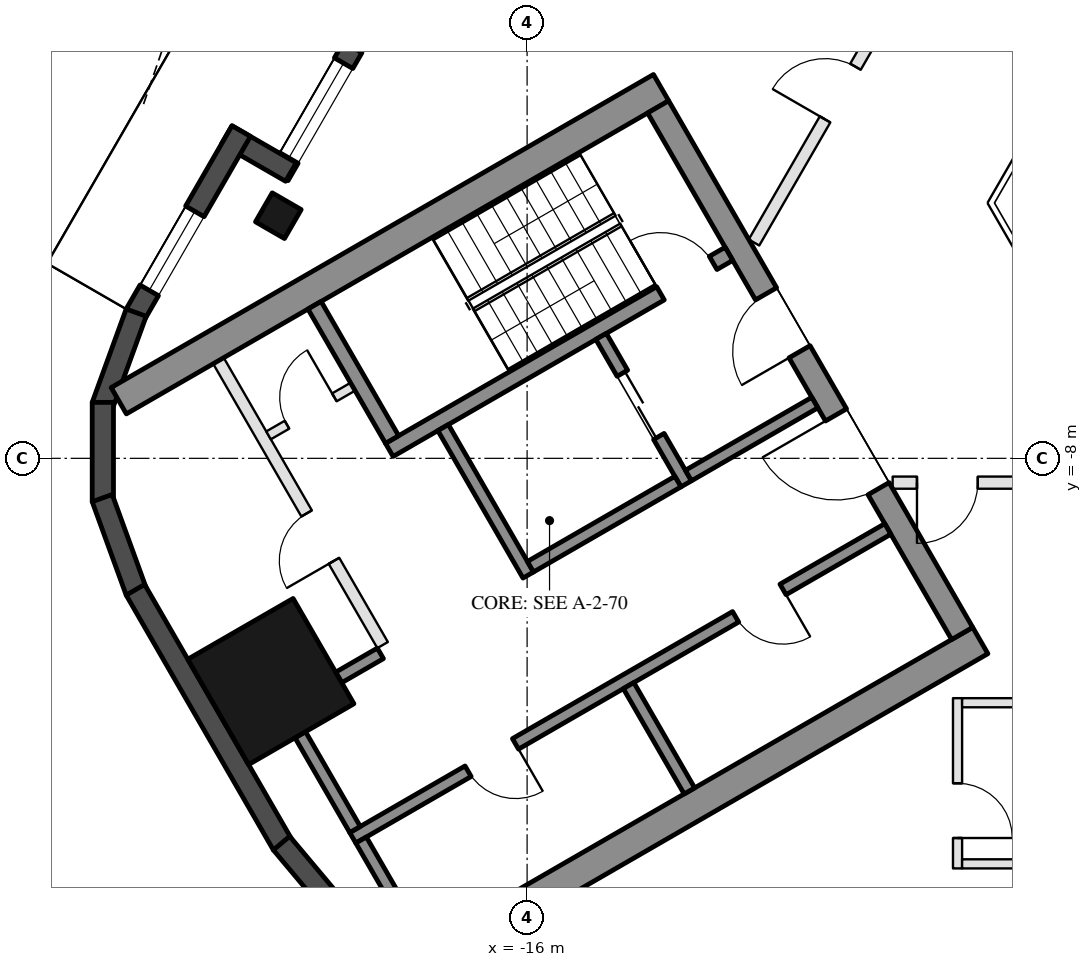
"""IFC4 building model, lengths in metres.
Left out: names, types, materials, properties, quantities, classifications, styles, units other than length and angle.
Written with IfcOpenShell. Run it as: python <this file> out.ifc"""

import sys

from ifc_helpers import new_model, si_unit, direction, frame, frame_2d, origin, origin_2d, place, context, subcontext, project, spatial, rectangle, hollow_rectangle, extrude, boolean, halfspace, element, fill, save


model = new_model("IFC4")
c1 = context("Model", 3, precision=1e-05, world=origin(), true_north=direction((0.0, 1.0)))
c2 = subcontext(c1, "Body", "Model", "MODEL_VIEW")
j1 = project(units=[si_unit("LENGTHUNIT", "METRE"), si_unit("PLANEANGLEUNIT", "RADIAN")], contexts=[c1])
p1 = place(None, origin())
s1 = spatial("IfcSite", under=j1, at=p1, CompositionType="ELEMENT")
p2 = place(p1, origin())
s2 = spatial("IfcBuilding", under=s1, at=p2, CompositionType="ELEMENT")
p3 = place(p2, frame((0.0, 0.0, 302.2)))
s3 = spatial("IfcBuildingStorey", under=s2, at=p3, CompositionType="ELEMENT", Elevation=302.2)
p4 = place(p3, frame((-20.091, -4.01, 0.0), z_axis=(0.0, 0.0, 1.0), x_axis=(0.5, 0.866025403784, 0.0)))
e1 = element("IfcColumn", 1, at=p4, inside=s3, PredefinedType="COLUMN", context=c2, shape_type="SweptSolid", body=[
    boolean("DIFFERENCE", extrude(hollow_rectangle(XDim=0.55, YDim=0.55, WallThickness=0.025, at=origin_2d()), origin(), (0.0, 0.0, 1.0), 3.7), halfspace(frame((0.0, 0.0, 0.04), z_axis=(0.0, 0.0, 1.0), x_axis=(1.0, 0.0, 0.0)), True)),
])
p5 = place(p3, frame((-20.214, -11.671, 0.0), z_axis=(0.0, 0.0, 1.0), x_axis=(-0.5, 0.866025403784, 0.0)))
e2 = element("IfcColumn", 2, at=p5, inside=s3, PredefinedType="COLUMN", context=c2, shape_type="SweptSolid", body=[
    boolean("DIFFERENCE", extrude(hollow_rectangle(XDim=2.0, YDim=2.0, WallThickness=0.05, at=origin_2d()), origin(), (0.0, 0.0, 1.0), 3.7), halfspace(frame((0.0, 0.0, 0.113), z_axis=(0.0, 0.0, 1.0), x_axis=(1.0, 0.0, 0.0)), True)),
])
p6 = place(p3, frame((-17.283, 1.504, 0.0), z_axis=(0.0, 0.0, 1.0), x_axis=(-0.500008054862, -0.866020753258, 0.0)))
e3 = element("IfcWall", 3, at=p6, inside=s3, PredefinedType="SOLIDWALL", context=c2, shape_type="SweptSolid", body=[
    extrude(rectangle(XDim=5.599, YDim=0.35, at=frame_2d((2.8, 0.0))), origin(), (0.0, 0.0, 1.0), 3.55),
])
p7 = place(p6, frame((0.77, 0.0, 0.0)))
e4 = element("IfcOpeningElement", 4, at=p7, cuts=e3, PredefinedType="OPENING", context=c2, shape_type="SweptSolid", body=[
    extrude(rectangle(XDim=2.4, YDim=2.4, at=frame_2d((1.2, 1.2))), frame((0.0, 0.185, 0.0), z_axis=(0.0, -1.0, 0.0), x_axis=(1.0, 0.0, 0.0)), (0.0, 0.0, 1.0), 0.37),
])
p8 = place(p6, frame((3.47, 0.0, 0.3)))
e5 = element("IfcOpeningElement", 5, at=p8, cuts=e3, PredefinedType="OPENING", context=c2, shape_type="SweptSolid", body=[
    extrude(rectangle(XDim=1.8, YDim=2.65, at=frame_2d((0.9, 1.325))), frame((0.0, 0.185, 0.0), z_axis=(0.0, -1.0, 0.0), x_axis=(1.0, 0.0, 0.0)), (0.0, 0.0, 1.0), 0.37),
])
p9 = place(p3, frame((-19.884, -3.292, 0.0), z_axis=(0.0, 0.0, 1.0), x_axis=(-0.866005645448, 0.500034220881, 0.0)))
e6 = element("IfcWall", 6, at=p9, inside=s3, PredefinedType="SOLIDWALL", context=c2, shape_type="SweptSolid", body=[
    extrude(rectangle(XDim=1.22, YDim=0.35, at=frame_2d((0.61, 0.0))), origin(), (0.0, 0.0, 1.0), 3.55),
])
p10 = place(p3, frame((-20.702, -2.618, 0.0), z_axis=(0.0, 0.0, 1.0), x_axis=(-0.499979528911, -0.866037222451, 0.0)))
e7 = element("IfcWall", 7, at=p10, inside=s3, PredefinedType="SOLIDWALL", context=c2, shape_type="SweptSolid", body=[
    extrude(rectangle(XDim=3.48, YDim=0.35, at=frame_2d((1.74, 0.0))), origin(), (0.0, 0.0, 1.0), 3.55),
])
p11 = place(p10, frame((1.525, 0.0, 0.3)))
e8 = element("IfcOpeningElement", 8, at=p11, cuts=e7, PredefinedType="OPENING", context=c2, shape_type="SweptSolid", body=[
    extrude(rectangle(XDim=1.5, YDim=2.65, at=frame_2d((0.75, 1.325))), frame((0.0, 0.185, 0.0), z_axis=(0.0, -1.0, 0.0), x_axis=(1.0, 0.0, 0.0)), (0.0, 0.0, 1.0), 0.37),
])
for number, where, z_axis, x_axis in (
    (9, (-22.429, -5.604, 0.0), (0.0, 0.0, 1.0), (-0.342, -0.94, 0.0)),
    (10, (-22.977, -7.08, 0.0), (0.0, 0.0, 1.0), (0.0, -1.0, 0.0)),
    (11, (-22.988, -8.654, 0.0), (0.0, 0.0, 1.0), (0.342, -0.94, 0.0)),
):
    element("IfcWall", number, at=place(p3, frame(where, z_axis=z_axis, x_axis=x_axis)), inside=s3, PredefinedType="SOLIDWALL", context=c2, shape_type="SweptSolid", body=[
        extrude(rectangle(XDim=1.634, YDim=0.35, at=frame_2d((0.817, 0.0))), origin(), (0.0, 0.0, 1.0), 3.55),
    ])
p12 = place(p3, frame((-22.442, -10.162, 0.0), z_axis=(0.0, 0.0, 1.0), x_axis=(0.500012048649, -0.866018447382, 0.0)))
e12 = element("IfcWall", 12, at=p12, inside=s3, PredefinedType="SOLIDWALL", context=c2, shape_type="SweptSolid", body=[
    extrude(rectangle(XDim=4.841, YDim=0.35, at=frame_2d((2.42, 0.0))), origin(), (0.0, 0.0, 1.0), 3.55),
])
p13 = place(p3, frame((-20.039, -14.329, 0.0), z_axis=(0.0, 0.0, 1.0), x_axis=(0.642708448155, -0.766110860562, 0.0)))
e13 = element("IfcWall", 13, at=p13, inside=s3, PredefinedType="SOLIDWALL", context=c2, shape_type="SweptSolid", body=[
    extrude(rectangle(XDim=1.634, YDim=0.35, at=frame_2d((0.817, 0.0))), origin(), (0.0, 0.0, 1.0), 3.55),
])
for number, where, z_axis, x_axis in (
    (14, (-13.797, -1.903, 0.0), (0.0, 0.0, 1.0), (-0.866, -0.5, 0.0)),
    (15, (-8.547, -10.997, 0.0), (0.0, 0.0, 1.0), (-0.866, -0.5, 0.0)),
):
    element("IfcWall", number, at=place(p3, frame(where, z_axis=z_axis, x_axis=x_axis)), inside=s3, PredefinedType="SHEAR", context=c2, shape_type="SweptSolid", body=[
        extrude(rectangle(XDim=10.298, YDim=0.5, at=frame_2d((5.149, 0.0))), origin(), (0.0, 0.0, 1.0), 3.5),
    ])
p14 = place(p3, frame((-13.845, -2.22, 0.0), z_axis=(0.0, 0.0, 1.0), x_axis=(0.500004234368, -0.866022959057, 0.0)))
e16 = element("IfcWall", 16, at=p14, inside=s3, PredefinedType="SHEAR", context=c2, shape_type="SweptSolid", body=[
    extrude(rectangle(XDim=10.0, YDim=0.4, at=frame_2d((5.0, 0.0))), origin(), (0.0, 0.0, 1.0), 3.5),
])
p15 = place(p14, frame((3.55, 0.0, 0.0)))
e17 = element("IfcOpeningElement", 17, at=p15, cuts=e16, PredefinedType="OPENING", context=c2, shape_type="SweptSolid", body=[
    extrude(rectangle(XDim=1.1, YDim=2.1, at=frame_2d((0.55, 1.05))), frame((0.0, 0.21, 0.0), z_axis=(0.0, -1.0, 0.0), x_axis=(1.0, 0.0, 0.0)), (0.0, 0.0, 1.0), 0.42),
])
p16 = place(p14, frame((5.85, 0.0, 0.0)))
e18 = element("IfcOpeningElement", 18, at=p16, cuts=e16, PredefinedType="OPENING", context=c2, shape_type="SweptSolid", body=[
    extrude(rectangle(XDim=1.4, YDim=2.1, at=frame_2d((0.7, 1.05))), frame((0.0, 0.21, 0.0), z_axis=(0.0, -1.0, 0.0), x_axis=(1.0, 0.0, 0.0)), (0.0, 0.0, 1.0), 0.42),
])
p17 = place(p3, frame((-12.681, -4.636, 0.0), z_axis=(0.0, 0.0, 1.0), x_axis=(-0.866021702275, -0.500006411147, 0.0)))
e19 = element("IfcWall", 19, at=p17, inside=s3, PredefinedType="SHEAR", context=c2, shape_type="SweptSolid", body=[
    extrude(rectangle(XDim=6.45, YDim=0.25, at=frame_2d((3.225, 0.0))), origin(), (0.0, 0.0, 1.0), 3.5),
])
p18 = place(p17, frame((0.3, 0.0, 0.0)))
e20 = element("IfcOpeningElement", 20, at=p18, cuts=e19, PredefinedType="OPENING", context=c2, shape_type="SweptSolid", body=[
    extrude(rectangle(XDim=1.0, YDim=2.1, at=frame_2d((0.5, 1.05))), frame((0.0, 0.135, 0.0), z_axis=(0.0, -1.0, 0.0), x_axis=(1.0, 0.0, 0.0)), (0.0, 0.0, 1.0), 0.27),
])
p19 = place(p3, frame((-19.496, -5.482, 0.0), z_axis=(0.0, 0.0, 1.0), x_axis=(0.499990435942, -0.866030925526, 0.0)))
e21 = element("IfcWall", 21, at=p19, inside=s3, PredefinedType="SHEAR", context=c2, shape_type="SweptSolid", body=[
    extrude(rectangle(XDim=2.55, YDim=0.25, at=frame_2d((1.275, 0.0))), origin(), (0.0, 0.0, 1.0), 3.5),
])
p20 = place(p3, frame((-17.381, -7.495, 0.0), z_axis=(0.0, 0.0, 1.0), x_axis=(0.500011755427, -0.866018616679, 0.0)))
e22 = element("IfcWall", 22, at=p20, inside=s3, PredefinedType="SHEAR", context=c2, shape_type="SweptSolid", body=[
    extrude(rectangle(XDim=2.8, YDim=0.2, at=frame_2d((1.4, 0.0))), origin(), (0.0, 0.0, 1.0), 3.5),
])
p21 = place(p3, frame((-14.783, -5.995, 0.0), z_axis=(0.0, 0.0, 1.0), x_axis=(0.49994636267, -0.866056369097, 0.0)))
e23 = element("IfcWall", 23, at=p21, inside=s3, PredefinedType="SHEAR", context=c2, shape_type="SweptSolid", body=[
    extrude(rectangle(XDim=2.8, YDim=0.2, at=frame_2d((1.4, 0.0))), origin(), (0.0, 0.0, 1.0), 3.5),
])
p22 = place(p21, frame((0.7, 0.0, 0.0)))
e24 = element("IfcOpeningElement", 24, at=p22, cuts=e23, PredefinedType="OPENING", context=c2, shape_type="SweptSolid", body=[
    extrude(rectangle(XDim=1.2, YDim=2.1, at=frame_2d((0.6, 1.05))), frame((0.0, 0.11, 0.0), z_axis=(0.0, -1.0, 0.0), x_axis=(1.0, 0.0, 0.0)), (0.0, 0.0, 1.0), 0.22),
])
p23 = place(p3, frame((-13.52, -8.383, 0.0), z_axis=(0.0, 0.0, 1.0), x_axis=(-0.866034573852, -0.49998411664, 0.0)))
e25 = element("IfcWall", 25, at=p23, inside=s3, PredefinedType="SHEAR", context=c2, shape_type="SweptSolid", body=[
    extrude(rectangle(XDim=2.8, YDim=0.2, at=frame_2d((1.4, 0.0))), origin(), (0.0, 0.0, 1.0), 3.5),
])
p24 = place(p3, frame((-11.268, -7.083, 0.0), z_axis=(0.0, 0.0, 1.0), x_axis=(-0.866050077142, -0.499957262057, 0.0)))
e26 = element("IfcWall", 26, at=p24, inside=s3, PredefinedType="SHEAR", context=c2, shape_type="SweptSolid", body=[
    extrude(rectangle(XDim=2.4, YDim=0.2, at=frame_2d((1.2, 0.0))), origin(), (0.0, 0.0, 1.0), 3.5),
])
p25 = place(p3, frame((-10.068, -9.162, 0.0), z_axis=(0.0, 0.0, 1.0), x_axis=(-0.866032725843, -0.499987317609, 0.0)))
e27 = element("IfcWall", 27, at=p25, inside=s3, PredefinedType="SHEAR", context=c2, shape_type="SweptSolid", body=[
    extrude(rectangle(XDim=10.16, YDim=0.2, at=frame_2d((5.08, 0.0))), origin(), (0.0, 0.0, 1.0), 3.5),
])
p26 = place(p25, frame((1.99, 0.0, 0.0)))
e28 = element("IfcOpeningElement", 28, at=p26, cuts=e27, PredefinedType="OPENING", context=c2, shape_type="SweptSolid", body=[
    extrude(rectangle(XDim=0.9, YDim=2.1, at=frame_2d((0.45, 1.05))), frame((0.0, 0.11, 0.0), z_axis=(0.0, -1.0, 0.0), x_axis=(1.0, 0.0, 0.0)), (0.0, 0.0, 1.0), 0.22),
])
p27 = place(p25, frame((7.07, 0.0, 0.0)))
e29 = element("IfcOpeningElement", 29, at=p27, cuts=e27, PredefinedType="OPENING", context=c2, shape_type="SweptSolid", body=[
    extrude(rectangle(XDim=0.9, YDim=2.1, at=frame_2d((0.45, 1.05))), frame((0.0, 0.11, 0.0), z_axis=(0.0, -1.0, 0.0), x_axis=(1.0, 0.0, 0.0)), (0.0, 0.0, 1.0), 0.22),
])
p28 = place(p3, frame((-19.73, -12.546, 0.0), z_axis=(0.0, 0.0, 1.0), x_axis=(0.500004188491, -0.866022985545, 0.0)))
e30 = element("IfcWall", 30, at=p28, inside=s3, PredefinedType="SHEAR", context=c2, shape_type="SweptSolid", body=[
    extrude(rectangle(XDim=1.8, YDim=0.2, at=frame_2d((0.9, 0.0))), origin(), (0.0, 0.0, 1.0), 3.5),
])
p29 = place(p3, frame((-18.413, -11.208, 0.0), z_axis=(0.0, 0.0, 1.0), x_axis=(-0.86597493103, -0.500087411186, 0.0)))
e31 = element("IfcWall", 31, at=p29, inside=s3, PredefinedType="SHEAR", context=c2, shape_type="SweptSolid", body=[
    extrude(rectangle(XDim=0.791, YDim=0.2, at=frame_2d((0.396, 0.0))), origin(), (0.0, 0.0, 1.0), 3.5),
])
for number, where, z_axis, x_axis in (
    (32, (-14.331, -11.738, 0.0), (0.0, 0.0, 1.0), (0.5, -0.866, 0.0)),
    (33, (-18.73, -14.278, 0.0), (0.0, 0.0, 1.0), (0.5, -0.866, 0.0)),
):
    element("IfcWall", number, at=place(p3, frame(where, z_axis=z_axis, x_axis=x_axis)), inside=s3, PredefinedType="SHEAR", context=c2, shape_type="SweptSolid", body=[
        extrude(rectangle(XDim=2.0, YDim=0.2, at=frame_2d((1.0, 0.0))), origin(), (0.0, 0.0, 1.0), 3.5),
    ])
p30 = place(p3, frame((-21.076, -6.395, 0.0), z_axis=(0.0, 0.0, 1.0), x_axis=(0.50001468107, -0.866016927499, 0.0)))
e34 = element("IfcWall", 34, at=p30, inside=s3, PredefinedType="PARTITIONING", context=c2, shape_type="SweptSolid", body=[
    extrude(rectangle(XDim=5.4, YDim=0.2, at=frame_2d((2.7, 0.0))), origin(), (0.0, 0.0, 1.0), 3.5),
])
p31 = place(p30, frame((2.9, 0.0, 0.0)))
e35 = element("IfcOpeningElement", 35, at=p31, cuts=e34, PredefinedType="OPENING", context=c2, shape_type="SweptSolid", body=[
    extrude(rectangle(XDim=0.9, YDim=2.1, at=frame_2d((0.45, 1.05))), frame((0.0, 0.11, 0.0), z_axis=(0.0, -1.0, 0.0), x_axis=(1.0, 0.0, 0.0)), (0.0, 0.0, 1.0), 0.22),
])
p32 = place(p3, frame((-18.866, -6.822, 0.0), z_axis=(0.0, 0.0, 1.0), x_axis=(-0.866028054938, -0.499995408039, 0.0)))
e36 = element("IfcWall", 36, at=p32, inside=s3, PredefinedType="PARTITIONING", context=c2, shape_type="SweptSolid", body=[
    extrude(rectangle(XDim=1.6, YDim=0.15, at=frame_2d((0.8, 0.0))), origin(), (0.0, 0.0, 1.0), 3.5),
])
p33 = place(p32, frame((0.35, 0.0, 0.0)))
e37 = element("IfcOpeningElement", 37, at=p33, cuts=e36, PredefinedType="OPENING", context=c2, shape_type="SweptSolid", body=[
    extrude(rectangle(XDim=0.9, YDim=2.1, at=frame_2d((0.45, 1.05))), frame((0.0, 0.085, 0.0), z_axis=(0.0, -1.0, 0.0), x_axis=(1.0, 0.0, 0.0)), (0.0, 0.0, 1.0), 0.17),
])
p34 = place(p3, frame((-7.93, -16.445, 0.0), z_axis=(0.0, 0.0, 1.0), x_axis=(0.224458408835, 0.974483669798, 0.0)))
e38 = element("IfcWall", 38, at=p34, inside=s3, PredefinedType="PARTITIONING", context=c2, shape_type="SweptSolid", body=[
    extrude(rectangle(XDim=8.358, YDim=0.2, at=frame_2d((4.179, 0.0))), origin(), (0.0, 0.0, 1.0), 3.1),
])
p35 = place(p3, frame((-6.18, -8.4, 0.0), z_axis=(0.0, 0.0, 1.0), x_axis=(-1.0, 0.0, 0.0)))
e39 = element("IfcWall", 39, at=p35, inside=s3, PredefinedType="PARTITIONING", context=c2, shape_type="SweptSolid", body=[
    extrude(rectangle(XDim=3.809, YDim=0.2, at=frame_2d((1.904, 0.0))), origin(), (0.0, 0.0, 1.0), 3.1),
])
p36 = place(p35, frame((2.409, 0.0, 0.0)))
e40 = element("IfcOpeningElement", 40, at=p36, cuts=e39, PredefinedType="OPENING", context=c2, shape_type="SweptSolid", body=[
    extrude(rectangle(XDim=1.0, YDim=2.1, at=frame_2d((0.5, 1.05))), frame((0.0, 0.11, 0.0), z_axis=(0.0, -1.0, 0.0), x_axis=(1.0, 0.0, 0.0)), (0.0, 0.0, 1.0), 0.22),
])
p37 = place(p3, frame((-8.921, -11.945, 0.0), z_axis=(0.0, 0.0, 1.0), x_axis=(0.0, -1.0, 0.0)))
e41 = element("IfcWall", 41, at=p37, inside=s3, PredefinedType="PARTITIONING", context=c2, shape_type="SweptSolid", body=[
    extrude(rectangle(XDim=2.8, YDim=0.15, at=frame_2d((1.4, 0.0))), origin(), (0.0, 0.0, 1.0), 3.55),
])
p38 = place(p37, frame((1.4, 0.0, 0.0)))
e42 = element("IfcOpeningElement", 42, at=p38, cuts=e41, PredefinedType="OPENING", context=c2, shape_type="SweptSolid", body=[
    extrude(rectangle(XDim=0.9, YDim=2.1, at=frame_2d((0.45, 1.05))), frame((0.0, 0.085, 0.0), z_axis=(0.0, -1.0, 0.0), x_axis=(1.0, 0.0, 0.0)), (0.0, 0.0, 1.0), 0.17),
])
p39 = place(p3, frame((-8.846, -14.67, 0.0), z_axis=(0.0, 0.0, 1.0), x_axis=(1.0, 0.0, 0.0)))
e43 = element("IfcWall", 43, at=p39, inside=s3, PredefinedType="PARTITIONING", context=c2, shape_type="SweptSolid", body=[
    extrude(rectangle(XDim=1.222, YDim=0.15, at=frame_2d((0.611, 0.0))), origin(), (0.0, 0.0, 1.0), 3.55),
])
p40 = place(p3, frame((-8.846, -12.02, 0.0), z_axis=(0.0, 0.0, 1.0), x_axis=(1.0, 0.0, 0.0)))
e44 = element("IfcWall", 44, at=p40, inside=s3, PredefinedType="PARTITIONING", context=c2, shape_type="SweptSolid", body=[
    extrude(rectangle(XDim=1.833, YDim=0.15, at=frame_2d((0.917, 0.0))), origin(), (0.0, 0.0, 1.0), 3.55),
])
p41 = place(p3, frame((-12.269, -4.45, 0.0), z_axis=(0.0, 0.0, 1.0), x_axis=(0.50002670742, 0.866009983699, 0.0)))
e45 = element("IfcWall", 45, at=p41, inside=s3, PredefinedType="PARTITIONING", context=c2, shape_type="SweptSolid", body=[
    extrude(rectangle(XDim=5.788, YDim=0.2, at=frame_2d((2.894, 0.0))), origin(), (0.0, 0.0, 1.0), 3.1),
])
p42 = place(p41, frame((2.338, 0.0, 0.0)))
e46 = element("IfcOpeningElement", 46, at=p42, cuts=e45, PredefinedType="OPENING", context=c2, shape_type="SweptSolid", body=[
    extrude(rectangle(XDim=1.0, YDim=2.1, at=frame_2d((0.5, 1.05))), frame((0.0, 0.11, 0.0), z_axis=(0.0, -1.0, 0.0), x_axis=(1.0, 0.0, 0.0)), (0.0, 0.0, 1.0), 0.22),
])
p43 = place(p8, origin())
e47 = element("IfcWindow", 47, at=p43, inside=s3, PartitioningType="SINGLE_PANEL", PredefinedType="WINDOW", context=c2, shape_type="SweptSolid", body=[
    extrude(rectangle(XDim=1.8, YDim=2.65, at=frame_2d((0.9, 1.325))), frame((0.0, 0.03, 0.0), z_axis=(0.0, -1.0, 0.0), x_axis=(1.0, 0.0, 0.0)), (0.0, 0.0, 1.0), 0.06),
])
fill(e5, e47)
p44 = place(p11, origin())
e48 = element("IfcWindow", 48, at=p44, inside=s3, PartitioningType="SINGLE_PANEL", PredefinedType="WINDOW", context=c2, shape_type="SweptSolid", body=[
    extrude(rectangle(XDim=1.5, YDim=2.65, at=frame_2d((0.75, 1.325))), frame((0.0, 0.03, 0.0), z_axis=(0.0, -1.0, 0.0), x_axis=(1.0, 0.0, 0.0)), (0.0, 0.0, 1.0), 0.06),
])
fill(e8, e48)
p45 = place(p22, origin())
e49 = element("IfcDoor", 49, at=p45, inside=s3, OperationType="DOUBLE_DOOR_SLIDING", PredefinedType="DOOR", context=c2, shape_type="SweptSolid", body=[
    extrude(rectangle(XDim=1.2, YDim=2.1, at=frame_2d((0.6, 1.05))), frame((0.0, 0.025, 0.0), z_axis=(0.0, -1.0, 0.0), x_axis=(1.0, 0.0, 0.0)), (0.0, 0.0, 1.0), 0.05),
])
fill(e24, e49)
p46 = place(p33, frame((0.9, 0.0, 0.0), z_axis=(0.0, 0.0, 1.0), x_axis=(-1.0, 0.0, 0.0)))
e50 = element("IfcDoor", 50, at=p46, inside=s3, OperationType="SINGLE_SWING_RIGHT", PredefinedType="DOOR", context=c2, shape_type="SweptSolid", body=[
    extrude(rectangle(XDim=0.9, YDim=2.1, at=frame_2d((0.45, 1.05))), frame((0.0, 0.025, 0.0), z_axis=(0.0, -1.0, 0.0), x_axis=(1.0, 0.0, 0.0)), (0.0, 0.0, 1.0), 0.05),
])
fill(e37, e50)
p47 = place(p26, origin())
e51 = element("IfcDoor", 51, at=p47, inside=s3, OperationType="SINGLE_SWING_LEFT", PredefinedType="DOOR", context=c2, shape_type="SweptSolid", body=[
    extrude(rectangle(XDim=0.9, YDim=2.1, at=frame_2d((0.45, 1.05))), frame((0.0, 0.025, 0.0), z_axis=(0.0, -1.0, 0.0), x_axis=(1.0, 0.0, 0.0)), (0.0, 0.0, 1.0), 0.05),
])
fill(e28, e51)
p48 = place(p27, origin())
e52 = element("IfcDoor", 52, at=p48, inside=s3, OperationType="SINGLE_SWING_LEFT", PredefinedType="DOOR", context=c2, shape_type="SweptSolid", body=[
    extrude(rectangle(XDim=0.9, YDim=2.1, at=frame_2d((0.45, 1.05))), frame((0.0, 0.025, 0.0), z_axis=(0.0, -1.0, 0.0), x_axis=(1.0, 0.0, 0.0)), (0.0, 0.0, 1.0), 0.05),
])
fill(e29, e52)
p49 = place(p31, frame((0.9, 0.0, 0.0), z_axis=(0.0, 0.0, 1.0), x_axis=(-1.0, 0.0, 0.0)))
e53 = element("IfcDoor", 53, at=p49, inside=s3, OperationType="SINGLE_SWING_LEFT", PredefinedType="DOOR", context=c2, shape_type="SweptSolid", body=[
    extrude(rectangle(XDim=0.9, YDim=2.1, at=frame_2d((0.45, 1.05))), frame((0.0, 0.025, 0.0), z_axis=(0.0, -1.0, 0.0), x_axis=(1.0, 0.0, 0.0)), (0.0, 0.0, 1.0), 0.05),
])
fill(e35, e53)
p50 = place(p15, frame((1.1, 0.0, 0.0), z_axis=(0.0, 0.0, 1.0), x_axis=(-1.0, 0.0, 0.0)))
e54 = element("IfcDoor", 54, at=p50, inside=s3, OperationType="SINGLE_SWING_LEFT", PredefinedType="DOOR", context=c2, shape_type="SweptSolid", body=[
    extrude(rectangle(XDim=1.1, YDim=2.1, at=frame_2d((0.55, 1.05))), frame((0.0, 0.025, 0.0), z_axis=(0.0, -1.0, 0.0), x_axis=(1.0, 0.0, 0.0)), (0.0, 0.0, 1.0), 0.05),
])
fill(e17, e54)
p51 = place(p16, frame((1.4, 0.0, 0.0), z_axis=(0.0, 0.0, 1.0), x_axis=(-1.0, 0.0, 0.0)))
e55 = element("IfcDoor", 55, at=p51, inside=s3, OperationType="DOUBLE_DOOR_SINGLE_SWING", PredefinedType="DOOR", context=c2, shape_type="SweptSolid", body=[
    extrude(rectangle(XDim=1.4, YDim=2.1, at=frame_2d((0.7, 1.05))), frame((0.0, 0.025, 0.0), z_axis=(0.0, -1.0, 0.0), x_axis=(1.0, 0.0, 0.0)), (0.0, 0.0, 1.0), 0.05),
])
fill(e18, e55)
p52 = place(p18, frame((1.0, 0.0, 0.0), z_axis=(0.0, 0.0, 1.0), x_axis=(-1.0, 0.0, 0.0)))
e56 = element("IfcDoor", 56, at=p52, inside=s3, OperationType="SINGLE_SWING_LEFT", PredefinedType="DOOR", context=c2, shape_type="SweptSolid", body=[
    extrude(rectangle(XDim=1.0, YDim=2.1, at=frame_2d((0.5, 1.05))), frame((0.0, 0.025, 0.0), z_axis=(0.0, -1.0, 0.0), x_axis=(1.0, 0.0, 0.0)), (0.0, 0.0, 1.0), 0.05),
])
fill(e20, e56)
p53 = place(p38, origin())
e57 = element("IfcDoor", 57, at=p53, inside=s3, OperationType="SINGLE_SWING_RIGHT", PredefinedType="DOOR", context=c2, shape_type="SweptSolid", body=[
    extrude(rectangle(XDim=0.9, YDim=2.1, at=frame_2d((0.45, 1.05))), frame((0.0, 0.025, 0.0), z_axis=(0.0, -1.0, 0.0), x_axis=(1.0, 0.0, 0.0)), (0.0, 0.0, 1.0), 0.05),
])
fill(e42, e57)
p54 = place(p36, origin())
e58 = element("IfcDoor", 58, at=p54, inside=s3, OperationType="SINGLE_SWING_RIGHT", PredefinedType="DOOR", context=c2, shape_type="SweptSolid", body=[
    extrude(rectangle(XDim=1.0, YDim=2.1, at=frame_2d((0.5, 1.05))), frame((0.0, 0.025, 0.0), z_axis=(0.0, -1.0, 0.0), x_axis=(1.0, 0.0, 0.0)), (0.0, 0.0, 1.0), 0.05),
])
fill(e40, e58)
p55 = place(p42, origin())
e59 = element("IfcDoor", 59, at=p55, inside=s3, OperationType="SINGLE_SWING_LEFT", PredefinedType="DOOR", context=c2, shape_type="SweptSolid", body=[
    extrude(rectangle(XDim=1.0, YDim=2.1, at=frame_2d((0.5, 1.05))), frame((0.0, 0.025, 0.0), z_axis=(0.0, -1.0, 0.0), x_axis=(1.0, 0.0, 0.0)), (0.0, 0.0, 1.0), 0.05),
])
fill(e46, e59)
save(model, sys.argv[1])
